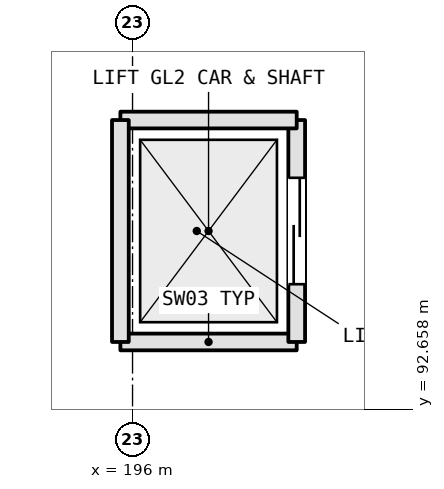
"""IFC4 building model, lengths in metres.
Left out: names, types, materials, properties, quantities, classifications, styles, units other than length and angle.
Written with IfcOpenShell. Run it as: python <this file> out.ifc"""

import sys

from ifc_helpers import new_model, si_unit, direction, frame, frame_2d, origin, place, context, subcontext, project, spatial, rectangle, extrude, element, fill, save


model = new_model("IFC4")
c1 = context("Model", 3, precision=1e-05, world=origin(), true_north=direction((0.0, 1.0)))
c2 = subcontext(c1, "Body", "Model", "MODEL_VIEW")
j1 = project(units=[si_unit("LENGTHUNIT", "METRE"), si_unit("PLANEANGLEUNIT", "RADIAN")], contexts=[c1])
p1 = place(None, origin())
s1 = spatial("IfcSite", under=j1, at=p1, CompositionType="ELEMENT")
p2 = place(p1, origin())
s2 = spatial("IfcBuilding", under=s1, at=p2, CompositionType="ELEMENT")
p3 = place(p2, frame((0.0, 0.0, 5.4)))
s3 = spatial("IfcBuildingStorey", under=s2, at=p3, CompositionType="ELEMENT", Elevation=5.4)
p4 = place(p3, frame((195.84, 93.54, 0.0), z_axis=(0.0, 0.0, 1.0), x_axis=(1.0, 0.0, 0.0)))
e1 = element("IfcWall", 1, at=p4, inside=s3, PredefinedType="SHEAR", context=c2, shape_type="SweptSolid", body=[
    extrude(rectangle(XDim=2.32, YDim=0.22, at=frame_2d((1.16, 0.0))), origin(), (0.0, 0.0, 1.0), 5.14),
])
p5 = place(p3, frame((198.16, 93.54, 0.0), z_axis=(0.0, 0.0, 1.0), x_axis=(0.0, 1.0, 0.0)))
e2 = element("IfcWall", 2, at=p5, inside=s3, PredefinedType="SHEAR", context=c2, shape_type="SweptSolid", body=[
    extrude(rectangle(XDim=2.92, YDim=0.22, at=frame_2d((1.46, 0.0))), origin(), (0.0, 0.0, 1.0), 5.14),
])
p6 = place(p5, frame((0.76, 0.0, 0.0)))
e3 = element("IfcOpeningElement", 3, at=p6, cuts=e2, PredefinedType="OPENING", context=c2, shape_type="SweptSolid", body=[
    extrude(rectangle(XDim=1.4, YDim=2.3, at=frame_2d((0.7, 1.15))), frame((0.0, 0.12, 0.0), z_axis=(0.0, -1.0, 0.0), x_axis=(1.0, 0.0, 0.0)), (0.0, 0.0, 1.0), 0.24),
])
p7 = place(p3, frame((198.16, 96.46, 0.0), z_axis=(0.0, 0.0, 1.0), x_axis=(-1.0, 0.0, 0.0)))
e4 = element("IfcWall", 4, at=p7, inside=s3, PredefinedType="SHEAR", context=c2, shape_type="SweptSolid", body=[
    extrude(rectangle(XDim=2.32, YDim=0.22, at=frame_2d((1.16, 0.0))), origin(), (0.0, 0.0, 1.0), 5.14),
])
p8 = place(p3, frame((195.84, 96.46, 0.0), z_axis=(0.0, 0.0, 1.0), x_axis=(0.0, -1.0, 0.0)))
e5 = element("IfcWall", 5, at=p8, inside=s3, PredefinedType="SHEAR", context=c2, shape_type="SweptSolid", body=[
    extrude(rectangle(XDim=2.92, YDim=0.22, at=frame_2d((1.46, 0.0))), origin(), (0.0, 0.0, 1.0), 5.14),
])
p9 = place(p6, origin())
e6 = element("IfcDoor", 6, at=p9, inside=s3, OperationType="DOUBLE_DOOR_SLIDING", PredefinedType="DOOR", context=c2, shape_type="SweptSolid", body=[
    extrude(rectangle(XDim=1.4, YDim=2.3, at=frame_2d((0.7, 1.15))), frame((0.0, 0.025, 0.0), z_axis=(0.0, -1.0, 0.0), x_axis=(1.0, 0.0, 0.0)), (0.0, 0.0, 1.0), 0.05),
])
fill(e3, e6)
save(model, sys.argv[1])
